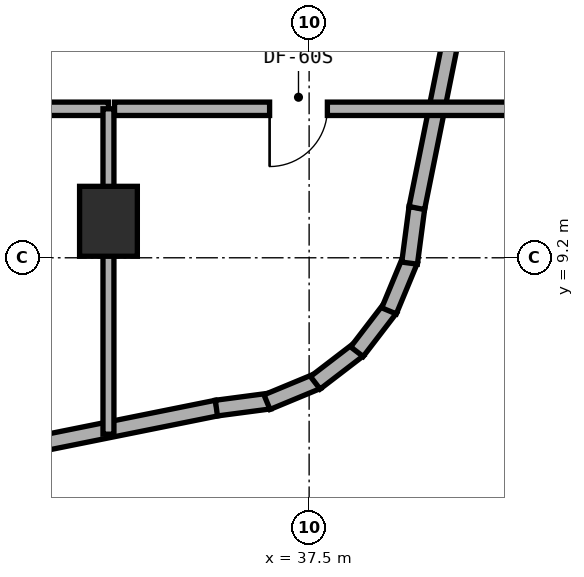
"""IFC4 building model, lengths in metres.
Left out: names, types, materials, properties, quantities, classifications, styles, units other than length and angle.
Written with IfcOpenShell. Run it as: python <this file> out.ifc"""

import sys

from ifc_helpers import new_model, si_unit, direction, frame, frame_2d, origin, origin_2d, place, context, subcontext, project, spatial, rectangle, extrude, element, fill, save


model = new_model("IFC4")
c1 = context("Model", 3, precision=1e-05, world=origin(), true_north=direction((0.0, 1.0)))
c2 = subcontext(c1, "Body", "Model", "MODEL_VIEW")
j1 = project(units=[si_unit("LENGTHUNIT", "METRE"), si_unit("PLANEANGLEUNIT", "RADIAN")], contexts=[c1])
p1 = place(None, origin())
s1 = spatial("IfcSite", under=j1, at=p1, CompositionType="ELEMENT")
p2 = place(p1, origin())
s2 = spatial("IfcBuilding", under=s1, at=p2, CompositionType="ELEMENT")
p3 = place(p2, frame((0.0, 0.0, 109.0)))
s3 = spatial("IfcBuildingStorey", under=s2, at=p3, CompositionType="ELEMENT", Elevation=109.0)
p4 = place(p3, frame((34.2, 9.8, 0.0), z_axis=(0.0, 0.0, 1.0), x_axis=(1.0, 0.0, 0.0)))
e1 = element("IfcColumn", 1, at=p4, inside=s3, PredefinedType="COLUMN", context=c2, shape_type="SweptSolid", body=[
    extrude(rectangle(XDim=0.95, YDim=1.15, at=origin_2d()), origin(), (0.0, 0.0, 1.0), 3.5),
])
p5 = place(p3, frame((26.98, 4.916, 0.0), z_axis=(0.0, 0.0, 1.0), x_axis=(0.980315963543, 0.197435082048, 0.0)))
e2 = element("IfcWall", 2, at=p5, inside=s3, PredefinedType="STANDARD", context=c2, shape_type="SweptSolid", body=[
    extrude(rectangle(XDim=9.183, YDim=0.26, at=frame_2d((4.591, 0.0))), origin(), (0.0, 0.0, 1.0), 3.22),
])
p6 = place(p5, frame((2.445, 0.0, 0.8)))
e3 = element("IfcOpeningElement", 3, at=p6, cuts=e2, PredefinedType="OPENING", context=c2, shape_type="SweptSolid", body=[
    extrude(rectangle(XDim=2.4, YDim=1.6, at=frame_2d((1.2, 0.8))), frame((0.0, 0.14, 0.0), z_axis=(0.0, -1.0, 0.0), x_axis=(1.0, 0.0, 0.0)), (0.0, 0.0, 1.0), 0.28),
])
p7 = place(p3, frame((35.975, 6.728, 0.0), z_axis=(0.0, 0.0, 1.0), x_axis=(0.991388484223, 0.130953706898, 0.0)))
e4 = element("IfcWall", 4, at=p7, inside=s3, PredefinedType="STANDARD", context=c2, shape_type="SweptSolid", body=[
    extrude(rectangle(XDim=0.885, YDim=0.26, at=frame_2d((0.443, 0.0))), origin(), (0.0, 0.0, 1.0), 3.22),
])
p8 = place(p3, frame((36.807, 6.826, 0.0), z_axis=(0.0, 0.0, 1.0), x_axis=(0.923627776508, 0.383290660547, 0.0)))
e5 = element("IfcWall", 5, at=p8, inside=s3, PredefinedType="STANDARD", context=c2, shape_type="SweptSolid", body=[
    extrude(rectangle(XDim=0.903, YDim=0.26, at=frame_2d((0.452, 0.0))), origin(), (0.0, 0.0, 1.0), 3.22),
])
p9 = place(p3, frame((37.601, 7.144, 0.0), z_axis=(0.0, 0.0, 1.0), x_axis=(0.793458244748, 0.608624690463, 0.0)))
e6 = element("IfcWall", 6, at=p9, inside=s3, PredefinedType="STANDARD", context=c2, shape_type="SweptSolid", body=[
    extrude(rectangle(XDim=0.902, YDim=0.26, at=frame_2d((0.451, 0.0))), origin(), (0.0, 0.0, 1.0), 3.22),
])
p10 = place(p3, frame((38.286, 7.655, 0.0), z_axis=(0.0, 0.0, 1.0), x_axis=(0.608494022858, 0.793558456666, 0.0)))
e7 = element("IfcWall", 7, at=p10, inside=s3, PredefinedType="STANDARD", context=c2, shape_type="SweptSolid", body=[
    extrude(rectangle(XDim=0.902, YDim=0.26, at=frame_2d((0.451, 0.0))), origin(), (0.0, 0.0, 1.0), 3.22),
])
p11 = place(p3, frame((38.814, 8.327, 0.0), z_axis=(0.0, 0.0, 1.0), x_axis=(0.383155708213, 0.923683767999, 0.0)))
e8 = element("IfcWall", 8, at=p11, inside=s3, PredefinedType="STANDARD", context=c2, shape_type="SweptSolid", body=[
    extrude(rectangle(XDim=0.903, YDim=0.26, at=frame_2d((0.451, 0.0))), origin(), (0.0, 0.0, 1.0), 3.22),
])
p12 = place(p3, frame((39.152, 9.112, 0.0), z_axis=(0.0, 0.0, 1.0), x_axis=(0.130200706103, 0.991487658083, 0.0)))
e9 = element("IfcWall", 9, at=p12, inside=s3, PredefinedType="STANDARD", context=c2, shape_type="SweptSolid", body=[
    extrude(rectangle(XDim=0.921, YDim=0.26, at=frame_2d((0.46, 0.0))), origin(), (0.0, 0.0, 1.0), 3.22),
])
p13 = place(p3, frame((39.271, 10.018, 0.0), z_axis=(0.0, 0.0, 1.0), x_axis=(0.197435082048, 0.980315963543, 0.0)))
e10 = element("IfcWall", 10, at=p13, inside=s3, PredefinedType="STANDARD", context=c2, shape_type="SweptSolid", body=[
    extrude(rectangle(XDim=9.183, YDim=0.26, at=frame_2d((4.591, 0.0))), origin(), (0.0, 0.0, 1.0), 3.22),
])
p14 = place(p13, frame((4.286, 0.0, 0.8)))
e11 = element("IfcOpeningElement", 11, at=p14, cuts=e10, PredefinedType="OPENING", context=c2, shape_type="SweptSolid", body=[
    extrude(rectangle(XDim=2.4, YDim=1.6, at=frame_2d((1.2, 0.8))), frame((0.0, 0.14, 0.0), z_axis=(0.0, -1.0, 0.0), x_axis=(1.0, 0.0, 0.0)), (0.0, 0.0, 1.0), 0.28),
])
p15 = place(p3, frame((28.0, 11.65, 0.0), z_axis=(0.0, 0.0, 1.0), x_axis=(1.0, 0.0, 0.0)))
e12 = element("IfcWall", 12, at=p15, inside=s3, PredefinedType="SOLIDWALL", context=c2, shape_type="SweptSolid", body=[
    extrude(rectangle(XDim=6.2, YDim=0.22, at=frame_2d((3.1, 0.0))), origin(), (0.0, 0.0, 1.0), 2.595),
])
p16 = place(p15, frame((2.625, 0.0, 0.0)))
e13 = element("IfcOpeningElement", 13, at=p16, cuts=e12, PredefinedType="OPENING", context=c2, shape_type="SweptSolid", body=[
    extrude(rectangle(XDim=0.95, YDim=2.1, at=frame_2d((0.475, 1.05))), frame((0.0, 0.12, 0.0), z_axis=(0.0, -1.0, 0.0), x_axis=(1.0, 0.0, 0.0)), (0.0, 0.0, 1.0), 0.24),
])
p17 = place(p3, frame((34.2, 6.299, 0.0), z_axis=(0.0, 0.0, 1.0), x_axis=(0.0, 1.0, 0.0)))
e14 = element("IfcWall", 14, at=p17, inside=s3, PredefinedType="SOLIDWALL", context=c2, shape_type="SweptSolid", body=[
    extrude(rectangle(XDim=5.351, YDim=0.18, at=frame_2d((2.675, 0.0))), origin(), (0.0, 0.0, 1.0), 2.595),
])
p18 = place(p3, frame((34.3, 11.65, 0.0), z_axis=(0.0, 0.0, 1.0), x_axis=(1.0, 0.0, 0.0)))
e15 = element("IfcWall", 15, at=p18, inside=s3, PredefinedType="SOLIDWALL", context=c2, shape_type="SweptSolid", body=[
    extrude(rectangle(XDim=6.64, YDim=0.22, at=frame_2d((3.32, 0.0))), origin(), (0.0, 0.0, 1.0), 2.835),
])
p19 = place(p18, frame((2.55, 0.0, 0.0)))
e16 = element("IfcOpeningElement", 16, at=p19, cuts=e15, PredefinedType="OPENING", context=c2, shape_type="SweptSolid", body=[
    extrude(rectangle(XDim=0.95, YDim=2.1, at=frame_2d((0.475, 1.05))), frame((0.0, 0.12, 0.0), z_axis=(0.0, -1.0, 0.0), x_axis=(1.0, 0.0, 0.0)), (0.0, 0.0, 1.0), 0.24),
])
p20 = place(p19, frame((0.95, 0.0, 0.0), z_axis=(0.0, 0.0, 1.0), x_axis=(-1.0, 0.0, 0.0)))
e17 = element("IfcDoor", 17, at=p20, inside=s3, OperationType="SINGLE_SWING_RIGHT", PredefinedType="DOOR", context=c2, shape_type="SweptSolid", body=[
    extrude(rectangle(XDim=0.95, YDim=2.1, at=frame_2d((0.475, 1.05))), frame((0.0, 0.025, 0.0), z_axis=(0.0, -1.0, 0.0), x_axis=(1.0, 0.0, 0.0)), (0.0, 0.0, 1.0), 0.05),
])
fill(e16, e17)
save(model, sys.argv[1])
